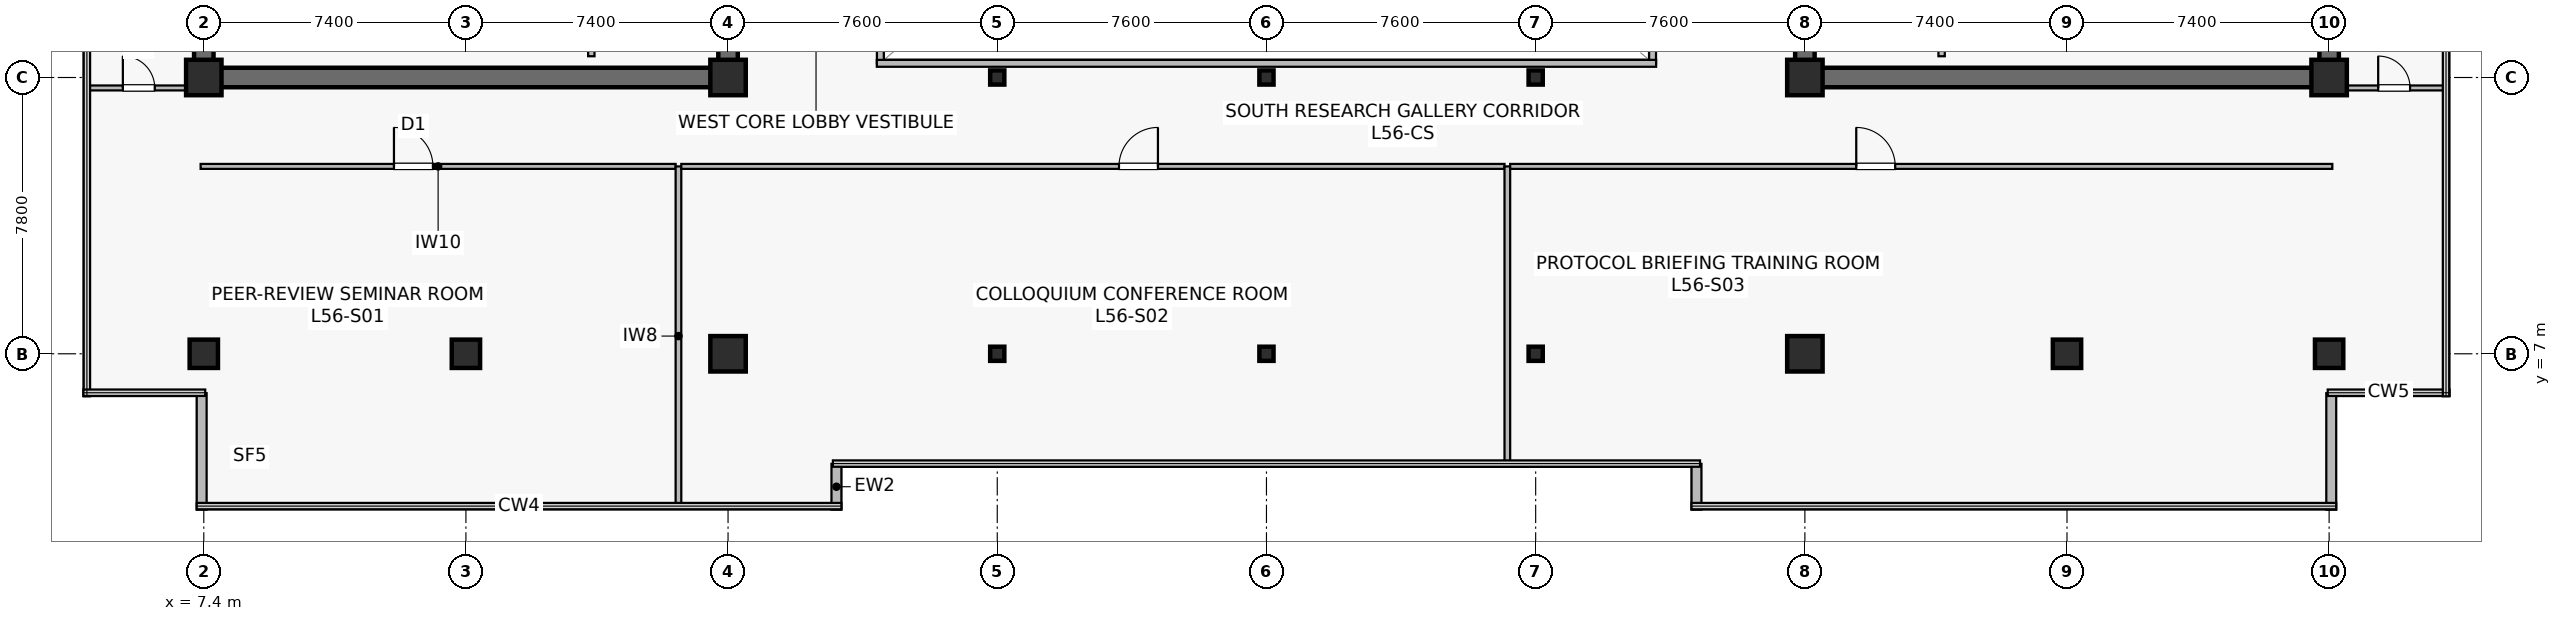
"""IFC4 building model, lengths in metres.
Left out: names, types, materials, properties, quantities, classifications, styles, units other than length and angle.
Written with IfcOpenShell. Run it as: python <this file> out.ifc"""

import sys

from ifc_helpers import new_model, si_unit, direction, frame, frame_2d, origin, origin_2d, place, context, subcontext, project, spatial, rectangle, hollow_rectangle, extrude, source, transform, mapped, element, fill, save


model = new_model("IFC4")
c1 = context("Model", 3, precision=1e-05, world=origin(), true_north=direction((0.0, 1.0)))
c2 = subcontext(c1, "Body", "Model", "MODEL_VIEW")
j1 = project(units=[si_unit("LENGTHUNIT", "METRE"), si_unit("PLANEANGLEUNIT", "RADIAN")], contexts=[c1])
p1 = place(None, origin())
s1 = spatial("IfcSite", under=j1, at=p1, CompositionType="ELEMENT")
p2 = place(p1, origin())
s2 = spatial("IfcBuilding", under=s1, at=p2, CompositionType="ELEMENT")
p3 = place(p2, frame((0.0, 0.0, 234.2)))
s3 = spatial("IfcBuildingStorey", under=s2, at=p3, CompositionType="ELEMENT", Elevation=234.2)
p4 = place(p3, frame((7.125, 14.8, 0.0), z_axis=(0.0, 0.0, 1.0), x_axis=(1.0, 0.0, 0.0)))
e1 = element("IfcWall", 1, at=p4, inside=s3, PredefinedType="SHEAR", context=c2, shape_type="SweptSolid", body=[
    extrude(rectangle(XDim=15.35, YDim=0.55, at=frame_2d((7.675, 0.0))), origin(), (0.0, 0.0, 1.0), 3.8),
])
p5 = place(p3, frame((7.4, 15.075, 0.0), z_axis=(0.0, 0.0, 1.0), x_axis=(0.0, 1.0, 0.0)))
e2 = element("IfcWall", 2, at=p5, inside=s3, PredefinedType="SHEAR", context=c2, shape_type="SweptSolid", body=[
    extrude(rectangle(XDim=18.45, YDim=0.55, at=frame_2d((9.225, 0.0))), origin(), (0.0, 0.0, 1.0), 3.8),
])
p6 = place(p3, frame((22.2, 15.075, 0.0), z_axis=(0.0, 0.0, 1.0), x_axis=(0.0, 1.0, 0.0)))
e3 = element("IfcWall", 3, at=p6, inside=s3, PredefinedType="SHEAR", context=c2, shape_type="SweptSolid", body=[
    extrude(rectangle(XDim=18.45, YDim=0.55, at=frame_2d((9.225, 0.0))), origin(), (0.0, 0.0, 1.0), 3.8),
])
p7 = place(p6, frame((3.475, 0.0, 0.0)))
e4 = element("IfcOpeningElement", 4, at=p7, cuts=e3, PredefinedType="OPENING", context=c2, shape_type="SweptSolid", body=[
    extrude(rectangle(XDim=1.42, YDim=2.2, at=frame_2d((0.71, 1.1))), frame((0.0, 0.285, 0.0), z_axis=(0.0, -1.0, 0.0), x_axis=(1.0, 0.0, 0.0)), (0.0, 0.0, 1.0), 0.57),
])
p8 = place(p3, frame((52.325, 14.8, 0.0), z_axis=(0.0, 0.0, 1.0), x_axis=(1.0, 0.0, 0.0)))
e5 = element("IfcWall", 5, at=p8, inside=s3, PredefinedType="SHEAR", context=c2, shape_type="SweptSolid", body=[
    extrude(rectangle(XDim=15.35, YDim=0.55, at=frame_2d((7.675, 0.0))), origin(), (0.0, 0.0, 1.0), 3.8),
])
p9 = place(p3, frame((52.6, 15.075, 0.0), z_axis=(0.0, 0.0, 1.0), x_axis=(0.0, 1.0, 0.0)))
e6 = element("IfcWall", 6, at=p9, inside=s3, PredefinedType="SHEAR", context=c2, shape_type="SweptSolid", body=[
    extrude(rectangle(XDim=18.45, YDim=0.55, at=frame_2d((9.225, 0.0))), origin(), (0.0, 0.0, 1.0), 3.8),
])
p10 = place(p9, frame((3.475, 0.0, 0.0)))
e7 = element("IfcOpeningElement", 7, at=p10, cuts=e6, PredefinedType="OPENING", context=c2, shape_type="SweptSolid", body=[
    extrude(rectangle(XDim=1.42, YDim=2.2, at=frame_2d((0.71, 1.1))), frame((0.0, 0.285, 0.0), z_axis=(0.0, -1.0, 0.0), x_axis=(1.0, 0.0, 0.0)), (0.0, 0.0, 1.0), 0.57),
])
p11 = place(p3, frame((67.4, 15.075, 0.0), z_axis=(0.0, 0.0, 1.0), x_axis=(0.0, 1.0, 0.0)))
e8 = element("IfcWall", 8, at=p11, inside=s3, PredefinedType="SHEAR", context=c2, shape_type="SweptSolid", body=[
    extrude(rectangle(XDim=18.45, YDim=0.55, at=frame_2d((9.225, 0.0))), origin(), (0.0, 0.0, 1.0), 3.8),
])
m1 = source(origin(), c2, "Body", "SweptSolid", [
    extrude(rectangle(XDim=0.8, YDim=0.8, at=origin_2d()), origin(), (0.0, 0.0, 1.0), 4.1),
])
p12 = place(p3, frame((14.8, 7.0, 0.0), z_axis=(0.0, 0.0, 1.0), x_axis=(1.0, 0.0, 0.0)))
e9 = element("IfcColumn", 9, at=p12, inside=s3, PredefinedType="COLUMN", context=c2, shape_type="MappedRepresentation", body=[
    mapped(m1, transform((0.0, 0.0, 0.0), scale=1.0)),
])
m2 = source(origin(), c2, "Body", "SweptSolid", [
    extrude(rectangle(XDim=1.0, YDim=1.0, at=origin_2d()), origin(), (0.0, 0.0, 1.0), 4.1),
])
for number, where, z_axis, x_axis in (
    (10, (22.2, 7.0, 0.0), (0.0, 0.0, 1.0), (1.0, 0.0, 0.0)),
    (11, (7.4, 14.8, 0.0), (0.0, 0.0, 1.0), (1.0, 0.0, 0.0)),
    (12, (22.2, 14.8, 0.0), (0.0, 0.0, 1.0), (1.0, 0.0, 0.0)),
    (13, (52.6, 7.0, 0.0), (0.0, 0.0, 1.0), (1.0, 0.0, 0.0)),
):
    element("IfcColumn", number, at=place(p3, frame(where, z_axis=z_axis, x_axis=x_axis)), inside=s3, PredefinedType="COLUMN", context=c2, shape_type="MappedRepresentation", body=[
        mapped(m2, transform((0.0, 0.0, 0.0), scale=1.0)),
    ])
p13 = place(p3, frame((60.0, 7.0, 0.0), z_axis=(0.0, 0.0, 1.0), x_axis=(1.0, 0.0, 0.0)))
e14 = element("IfcColumn", 14, at=p13, inside=s3, PredefinedType="COLUMN", context=c2, shape_type="MappedRepresentation", body=[
    mapped(m1, transform((0.0, 0.0, 0.0), scale=1.0)),
])
for number, where, z_axis, x_axis in (
    (15, (52.6, 14.8, 0.0), (0.0, 0.0, 1.0), (1.0, 0.0, 0.0)),
    (16, (67.4, 14.8, 0.0), (0.0, 0.0, 1.0), (1.0, 0.0, 0.0)),
):
    element("IfcColumn", number, at=place(p3, frame(where, z_axis=z_axis, x_axis=x_axis)), inside=s3, PredefinedType="COLUMN", context=c2, shape_type="MappedRepresentation", body=[
        mapped(m2, transform((0.0, 0.0, 0.0), scale=1.0)),
    ])
for number, where, z_axis, x_axis in (
    (17, (7.4, 7.0, 0.0), (0.0, 0.0, 1.0), (1.0, 0.0, 0.0)),
    (18, (67.4, 7.0, 0.0), (0.0, 0.0, 1.0), (1.0, 0.0, 0.0)),
):
    element("IfcColumn", number, at=place(p3, frame(where, z_axis=z_axis, x_axis=x_axis)), inside=s3, PredefinedType="COLUMN", context=c2, shape_type="MappedRepresentation", body=[
        mapped(m1, transform((0.0, 0.0, 0.0), scale=1.0)),
    ])
m3 = source(origin(), c2, "Body", "SweptSolid", [
    extrude(hollow_rectangle(XDim=0.4, YDim=0.4, WallThickness=0.019, at=origin_2d()), origin(), (0.0, 0.0, 1.0), 4.1),
])
for number, where, z_axis, x_axis in (
    (19, (29.8, 7.0, 0.0), (0.0, 0.0, 1.0), (1.0, 0.0, 0.0)),
    (20, (29.8, 14.8, 0.0), (0.0, 0.0, 1.0), (1.0, 0.0, 0.0)),
    (21, (37.4, 7.0, 0.0), (0.0, 0.0, 1.0), (1.0, 0.0, 0.0)),
    (22, (37.4, 14.8, 0.0), (0.0, 0.0, 1.0), (1.0, 0.0, 0.0)),
    (23, (45.0, 7.0, 0.0), (0.0, 0.0, 1.0), (1.0, 0.0, 0.0)),
    (24, (45.0, 14.8, 0.0), (0.0, 0.0, 1.0), (1.0, 0.0, 0.0)),
):
    element("IfcColumn", number, at=place(p3, frame(where, z_axis=z_axis, x_axis=x_axis)), inside=s3, PredefinedType="COLUMN", context=c2, shape_type="MappedRepresentation", body=[
        mapped(m3, transform((0.0, 0.0, 0.0), scale=1.0)),
    ])
for number, where, z_axis, x_axis in (
    (25, (25.26, 2.6, 0.0), (0.0, 0.0, 1.0), (0.0, 1.0, 0.0)),
    (26, (49.54, 3.893, 0.0), (0.0, 0.0, 1.0), (0.0, -1.0, 0.0)),
):
    element("IfcWall", number, at=place(p3, frame(where, z_axis=z_axis, x_axis=x_axis)), inside=s3, PredefinedType="STANDARD", context=c2, shape_type="SweptSolid", body=[
        extrude(rectangle(XDim=1.293, YDim=0.28, at=frame_2d((0.646, 0.0))), origin(), (0.0, 0.0, 1.0), 3.8),
    ])
for number, where, z_axis, x_axis in (
    (27, (67.46, 2.6, 0.0), (0.0, 0.0, 1.0), (0.0, 1.0, 0.0)),
    (28, (7.34, 5.888, 0.0), (0.0, 0.0, 1.0), (0.0, -1.0, 0.0)),
):
    element("IfcWall", number, at=place(p3, frame(where, z_axis=z_axis, x_axis=x_axis)), inside=s3, PredefinedType="STANDARD", context=c2, shape_type="SweptSolid", body=[
        extrude(rectangle(XDim=3.288, YDim=0.28, at=frame_2d((1.644, 0.0))), origin(), (0.0, 0.0, 1.0), 3.8),
    ])
for number, where, z_axis, x_axis in (
    (29, (18.34, 15.4, 0.0), (0.0, 0.0, 1.0), (0.0, 1.0, 0.0)),
    (30, (56.46, 15.4, 0.0), (0.0, 0.0, 1.0), (0.0, 1.0, 0.0)),
):
    element("IfcWall", number, at=place(p3, frame(where, z_axis=z_axis, x_axis=x_axis)), inside=s3, PredefinedType="SOLIDWALL", context=c2, shape_type="SweptSolid", body=[
        extrude(rectangle(XDim=2.4, YDim=0.18, at=frame_2d((1.2, 0.0))), origin(), (0.0, 0.0, 1.0), 3.8),
    ])
p14 = place(p3, frame((26.5, 15.2, 0.0), z_axis=(0.0, 0.0, 1.0), x_axis=(0.0, 1.0, 0.0)))
e31 = element("IfcWall", 31, at=p14, inside=s3, PredefinedType="SOLIDWALL", context=c2, shape_type="SweptSolid", body=[
    extrude(rectangle(XDim=18.2, YDim=0.195, at=frame_2d((9.1, 0.0))), origin(), (0.0, 0.0, 1.0), 3.8),
])
p15 = place(p14, frame((1.8, 0.0, 0.9)))
e32 = element("IfcOpeningElement", 32, at=p15, cuts=e31, PredefinedType="OPENING", context=c2, shape_type="SweptSolid", body=[
    extrude(rectangle(XDim=1.5, YDim=1.4, at=frame_2d((0.75, 0.7))), frame((0.0, 0.107, 0.0), z_axis=(0.0, -1.0, 0.0), x_axis=(1.0, 0.0, 0.0)), (0.0, 0.0, 1.0), 0.215),
])
p16 = place(p14, frame((13.2, 0.0, 0.9)))
e33 = element("IfcOpeningElement", 33, at=p16, cuts=e31, PredefinedType="OPENING", context=c2, shape_type="SweptSolid", body=[
    extrude(rectangle(XDim=1.5, YDim=1.4, at=frame_2d((0.75, 0.7))), frame((0.0, 0.107, 0.0), z_axis=(0.0, -1.0, 0.0), x_axis=(1.0, 0.0, 0.0)), (0.0, 0.0, 1.0), 0.215),
])
p17 = place(p3, frame((48.3, 15.2, 0.0), z_axis=(0.0, 0.0, 1.0), x_axis=(0.0, 1.0, 0.0)))
e34 = element("IfcWall", 34, at=p17, inside=s3, PredefinedType="SOLIDWALL", context=c2, shape_type="SweptSolid", body=[
    extrude(rectangle(XDim=18.2, YDim=0.195, at=frame_2d((9.1, 0.0))), origin(), (0.0, 0.0, 1.0), 3.8),
])
p18 = place(p17, frame((1.8, 0.0, 0.9)))
e35 = element("IfcOpeningElement", 35, at=p18, cuts=e34, PredefinedType="OPENING", context=c2, shape_type="SweptSolid", body=[
    extrude(rectangle(XDim=1.5, YDim=1.4, at=frame_2d((0.75, 0.7))), frame((0.0, 0.107, 0.0), z_axis=(0.0, -1.0, 0.0), x_axis=(1.0, 0.0, 0.0)), (0.0, 0.0, 1.0), 0.215),
])
p19 = place(p17, frame((13.2, 0.0, 0.9)))
e36 = element("IfcOpeningElement", 36, at=p19, cuts=e34, PredefinedType="OPENING", context=c2, shape_type="SweptSolid", body=[
    extrude(rectangle(XDim=1.5, YDim=1.4, at=frame_2d((0.75, 0.7))), frame((0.0, 0.107, 0.0), z_axis=(0.0, -1.0, 0.0), x_axis=(1.0, 0.0, 0.0)), (0.0, 0.0, 1.0), 0.215),
])
p20 = place(p3, frame((26.4, 15.2, 0.0), z_axis=(0.0, 0.0, 1.0), x_axis=(1.0, 0.0, 0.0)))
e37 = element("IfcWall", 37, at=p20, inside=s3, PredefinedType="SOLIDWALL", context=c2, shape_type="SweptSolid", body=[
    extrude(rectangle(XDim=22.0, YDim=0.195, at=frame_2d((11.0, 0.0))), origin(), (0.0, 0.0, 1.0), 3.8),
])
p21 = place(p3, frame((7.31, 12.29, 0.0), z_axis=(0.0, 0.0, 1.0), x_axis=(1.0, 0.0, 0.0)))
e38 = element("IfcWall", 38, at=p21, inside=s3, PredefinedType="PARTITIONING", context=c2, shape_type="SweptSolid", body=[
    extrude(rectangle(XDim=13.41, YDim=0.14, at=frame_2d((6.705, 0.0))), origin(), (0.0, 0.0, 1.0), 3.197),
])
p22 = place(p21, frame((5.458, 0.0, 0.0)))
e39 = element("IfcOpeningElement", 39, at=p22, cuts=e38, PredefinedType="OPENING", context=c2, shape_type="SweptSolid", body=[
    extrude(rectangle(XDim=1.1, YDim=2.18, at=frame_2d((0.55, 1.09))), frame((0.0, 0.08, 0.0), z_axis=(0.0, -1.0, 0.0), x_axis=(1.0, 0.0, 0.0)), (0.0, 0.0, 1.0), 0.16),
])
p23 = place(p3, frame((20.8, 2.71, 0.0), z_axis=(0.0, 0.0, 1.0), x_axis=(0.0, 1.0, 0.0)))
e40 = element("IfcWall", 40, at=p23, inside=s3, PredefinedType="PARTITIONING", context=c2, shape_type="SweptSolid", body=[
    extrude(rectangle(XDim=9.58, YDim=0.16, at=frame_2d((4.79, 0.0))), origin(), (0.0, 0.0, 1.0), 3.135),
])
p24 = place(p3, frame((20.88, 12.29, 0.0), z_axis=(0.0, 0.0, 1.0), x_axis=(1.0, 0.0, 0.0)))
e41 = element("IfcWall", 41, at=p24, inside=s3, PredefinedType="PARTITIONING", context=c2, shape_type="SweptSolid", body=[
    extrude(rectangle(XDim=23.24, YDim=0.14, at=frame_2d((11.62, 0.0))), origin(), (0.0, 0.0, 1.0), 3.197),
])
p25 = place(p24, frame((12.356, 0.0, 0.0)))
e42 = element("IfcOpeningElement", 42, at=p25, cuts=e41, PredefinedType="OPENING", context=c2, shape_type="SweptSolid", body=[
    extrude(rectangle(XDim=1.1, YDim=2.18, at=frame_2d((0.55, 1.09))), frame((0.0, 0.08, 0.0), z_axis=(0.0, -1.0, 0.0), x_axis=(1.0, 0.0, 0.0)), (0.0, 0.0, 1.0), 0.16),
])
p26 = place(p3, frame((44.2, 3.91, 0.0), z_axis=(0.0, 0.0, 1.0), x_axis=(0.0, 1.0, 0.0)))
e43 = element("IfcWall", 43, at=p26, inside=s3, PredefinedType="PARTITIONING", context=c2, shape_type="SweptSolid", body=[
    extrude(rectangle(XDim=8.38, YDim=0.16, at=frame_2d((4.19, 0.0))), origin(), (0.0, 0.0, 1.0), 3.135),
])
p27 = place(p3, frame((44.28, 12.29, 0.0), z_axis=(0.0, 0.0, 1.0), x_axis=(1.0, 0.0, 0.0)))
e44 = element("IfcWall", 44, at=p27, inside=s3, PredefinedType="PARTITIONING", context=c2, shape_type="SweptSolid", body=[
    extrude(rectangle(XDim=23.21, YDim=0.14, at=frame_2d((11.605, 0.0))), origin(), (0.0, 0.0, 1.0), 3.197),
])
p28 = place(p27, frame((9.771, 0.0, 0.0)))
e45 = element("IfcOpeningElement", 45, at=p28, cuts=e44, PredefinedType="OPENING", context=c2, shape_type="SweptSolid", body=[
    extrude(rectangle(XDim=1.1, YDim=2.18, at=frame_2d((0.55, 1.09))), frame((0.0, 0.08, 0.0), z_axis=(0.0, -1.0, 0.0), x_axis=(1.0, 0.0, 0.0)), (0.0, 0.0, 1.0), 0.16),
])
p29 = place(p3, frame((4.11, 14.505, 0.0), z_axis=(0.0, 0.0, 1.0), x_axis=(1.0, 0.0, 0.0)))
e46 = element("IfcWall", 46, at=p29, inside=s3, PredefinedType="PARTITIONING", context=c2, shape_type="SweptSolid", body=[
    extrude(rectangle(XDim=2.91, YDim=0.14, at=frame_2d((1.455, 0.0))), origin(), (0.0, 0.0, 1.0), 3.8),
])
p30 = place(p29, frame((1.005, 0.0, 0.0)))
e47 = element("IfcOpeningElement", 47, at=p30, cuts=e46, PredefinedType="OPENING", context=c2, shape_type="SweptSolid", body=[
    extrude(rectangle(XDim=0.9, YDim=2.1, at=frame_2d((0.45, 1.05))), frame((0.0, 0.08, 0.0), z_axis=(0.0, -1.0, 0.0), x_axis=(1.0, 0.0, 0.0)), (0.0, 0.0, 1.0), 0.16),
])
p31 = place(p3, frame((67.78, 14.505, 0.0), z_axis=(0.0, 0.0, 1.0), x_axis=(1.0, 0.0, 0.0)))
e48 = element("IfcWall", 48, at=p31, inside=s3, PredefinedType="PARTITIONING", context=c2, shape_type="SweptSolid", body=[
    extrude(rectangle(XDim=2.91, YDim=0.14, at=frame_2d((1.455, 0.0))), origin(), (0.0, 0.0, 1.0), 3.8),
])
p32 = place(p31, frame((1.005, 0.0, 0.0)))
e49 = element("IfcOpeningElement", 49, at=p32, cuts=e48, PredefinedType="OPENING", context=c2, shape_type="SweptSolid", body=[
    extrude(rectangle(XDim=0.9, YDim=2.1, at=frame_2d((0.45, 1.05))), frame((0.0, 0.08, 0.0), z_axis=(0.0, -1.0, 0.0), x_axis=(1.0, 0.0, 0.0)), (0.0, 0.0, 1.0), 0.16),
])
m4 = source(origin(), c2, "Body", "SweptSolid", [
    extrude(rectangle(XDim=1.1, YDim=2.18, at=frame_2d((0.55, 1.09))), frame((0.0, 0.025, 0.0), z_axis=(0.0, -1.0, 0.0), x_axis=(1.0, 0.0, 0.0)), (0.0, 0.0, 1.0), 0.05),
])
p33 = place(p22, origin())
e50 = element("IfcDoor", 50, at=p33, inside=s3, OperationType="SINGLE_SWING_LEFT", PredefinedType="DOOR", context=c2, shape_type="MappedRepresentation", body=[
    mapped(m4, transform((0.0, 0.0, 0.0), scale=1.0)),
])
fill(e39, e50)
p34 = place(p25, origin())
e51 = element("IfcDoor", 51, at=p34, inside=s3, OperationType="SINGLE_SWING_RIGHT", PredefinedType="DOOR", context=c2, shape_type="MappedRepresentation", body=[
    mapped(m4, transform((0.0, 0.0, 0.0), scale=1.0)),
])
fill(e42, e51)
p35 = place(p28, origin())
e52 = element("IfcDoor", 52, at=p35, inside=s3, OperationType="SINGLE_SWING_LEFT", PredefinedType="DOOR", context=c2, shape_type="MappedRepresentation", body=[
    mapped(m4, transform((0.0, 0.0, 0.0), scale=1.0)),
])
fill(e45, e52)
m5 = source(origin(), c2, "Body", "SweptSolid", [
    extrude(rectangle(XDim=0.9, YDim=2.1, at=frame_2d((0.45, 1.05))), frame((0.0, 0.025, 0.0), z_axis=(0.0, -1.0, 0.0), x_axis=(1.0, 0.0, 0.0)), (0.0, 0.0, 1.0), 0.05),
])
p36 = place(p30, origin())
e53 = element("IfcDoor", 53, at=p36, inside=s3, OperationType="SINGLE_SWING_LEFT", PredefinedType="DOOR", context=c2, shape_type="MappedRepresentation", body=[
    mapped(m5, transform((0.0, 0.0, 0.0), scale=1.0)),
])
fill(e47, e53)
p37 = place(p32, origin())
e54 = element("IfcDoor", 54, at=p37, inside=s3, OperationType="SINGLE_SWING_LEFT", PredefinedType="DOOR", context=c2, shape_type="MappedRepresentation", body=[
    mapped(m5, transform((0.0, 0.0, 0.0), scale=1.0)),
])
fill(e49, e54)
save(model, sys.argv[1])
